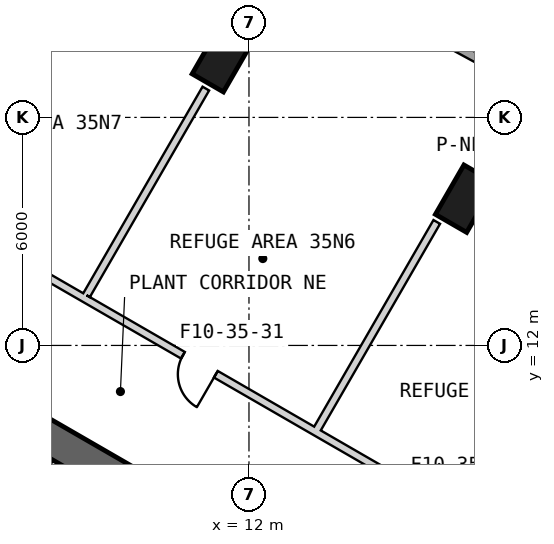
"""IFC4 building model, lengths in metres.
Left out: names, types, materials, properties, quantities, classifications, styles, units other than length and angle.
Written with IfcOpenShell. Run it as: python <this file> out.ifc"""

import sys

from ifc_helpers import new_model, si_unit, direction, frame, frame_2d, origin, origin_2d, place, context, subcontext, project, spatial, rectangle, extrude, element, fill, save


model = new_model("IFC4")
c1 = context("Model", 3, precision=1e-05, world=origin(), true_north=direction((0.0, 1.0)))
c2 = subcontext(c1, "Body", "Model", "MODEL_VIEW")
j1 = project(units=[si_unit("LENGTHUNIT", "METRE"), si_unit("PLANEANGLEUNIT", "RADIAN")], contexts=[c1])
p1 = place(None, origin())
s1 = spatial("IfcSite", under=j1, at=p1, CompositionType="ELEMENT")
p2 = place(p1, origin())
s2 = spatial("IfcBuilding", under=s1, at=p2, CompositionType="ELEMENT")
p3 = place(p2, frame((0.0, 0.0, 163.2)))
s3 = spatial("IfcBuildingStorey", under=s2, at=p3, CompositionType="ELEMENT", Elevation=163.2)
for number, where, z_axis, x_axis in (
    (1, (17.692, 15.861, 0.0), (0.0, 0.0, 1.0), (0.5, 0.866, 0.0)),
    (2, (11.291, 19.557, 0.0), (0.0, 0.0, 1.0), (0.5, 0.866, 0.0)),
):
    element("IfcColumn", number, at=place(p3, frame(where, z_axis=z_axis, x_axis=x_axis)), inside=s3, PredefinedType="COLUMN", context=c2, shape_type="SweptSolid", body=[
        extrude(rectangle(XDim=1.5, YDim=0.95, at=origin_2d()), origin(), (0.0, 0.0, 1.0), 5.7),
    ])
p4 = place(p3, frame((19.475, 2.208, 0.0), z_axis=(0.0, 0.0, 1.0), x_axis=(-0.866028369851, 0.499994862586, 0.0)))
e3 = element("IfcWall", 3, at=p4, inside=s3, PredefinedType="SHEAR", context=c2, shape_type="SweptSolid", body=[
    extrude(rectangle(XDim=31.523, YDim=0.9, at=frame_2d((15.762, 0.0))), origin(), (0.0, 0.0, 1.0), 6.0),
])
p5 = place(p4, frame((3.612, 0.0, 0.0)))
e4 = element("IfcOpeningElement", 4, at=p5, cuts=e3, PredefinedType="OPENING", context=c2, shape_type="SweptSolid", body=[
    extrude(rectangle(XDim=1.2, YDim=2.4, at=frame_2d((0.6, 1.2))), frame((0.0, 0.46, 0.0), z_axis=(0.0, -1.0, 0.0), x_axis=(1.0, 0.0, 0.0)), (0.0, 0.0, 1.0), 0.92),
])
p6 = place(p4, frame((26.712, 0.0, 0.0)))
e5 = element("IfcOpeningElement", 5, at=p6, cuts=e3, PredefinedType="OPENING", context=c2, shape_type="SweptSolid", body=[
    extrude(rectangle(XDim=1.2, YDim=2.4, at=frame_2d((0.6, 1.2))), frame((0.0, 0.46, 0.0), z_axis=(0.0, -1.0, 0.0), x_axis=(1.0, 0.0, 0.0)), (0.0, 0.0, 1.0), 0.92),
])
p7 = place(p3, frame((29.693, 13.206, 0.0), z_axis=(0.0, 0.0, 1.0), x_axis=(-0.878694903116, 0.477383773539, 0.0)))
e6 = element("IfcWall", 6, at=p7, inside=s3, PredefinedType="SOLIDWALL", context=c2, shape_type="SweptSolid", body=[
    extrude(rectangle(XDim=38.239, YDim=0.24, at=frame_2d((19.12, 0.0))), origin(), (0.0, 0.0, 1.0), 5.7),
])
p8 = place(p3, frame((6.795, 9.01, 0.0), z_axis=(0.0, 0.0, 1.0), x_axis=(-0.499984717929, -0.866034226713, 0.0)))
e7 = element("IfcWall", 7, at=p8, inside=s3, PredefinedType="PARTITIONING", context=c2, shape_type="SweptSolid", body=[
    extrude(rectangle(XDim=3.25, YDim=0.12, at=frame_2d((1.625, 0.0))), origin(), (0.0, 0.0, 1.0), 5.7),
])
p9 = place(p8, frame((1.225, 0.0, 0.0)))
e8 = element("IfcOpeningElement", 8, at=p9, cuts=e7, PredefinedType="OPENING", context=c2, shape_type="SweptSolid", body=[
    extrude(rectangle(XDim=0.8, YDim=2.1, at=frame_2d((0.4, 1.05))), frame((0.0, 0.07, 0.0), z_axis=(0.0, -1.0, 0.0), x_axis=(1.0, 0.0, 0.0)), (0.0, 0.0, 1.0), 0.14),
])
p10 = place(p3, frame((19.846, 6.208, 0.0), z_axis=(0.0, 0.0, 1.0), x_axis=(-0.866029143232, 0.499993523031, 0.0)))
e9 = element("IfcWall", 9, at=p10, inside=s3, PredefinedType="PARTITIONING", context=c2, shape_type="SweptSolid", body=[
    extrude(rectangle(XDim=7.017, YDim=0.2, at=frame_2d((3.508, 0.0))), origin(), (0.0, 0.0, 1.0), 4.98),
])
p11 = place(p10, frame((3.05, 0.0, 0.0)))
e10 = element("IfcOpeningElement", 10, at=p11, cuts=e9, PredefinedType="OPENING", context=c2, shape_type="SweptSolid", body=[
    extrude(rectangle(XDim=1.0, YDim=2.1, at=frame_2d((0.5, 1.05))), frame((0.0, 0.11, 0.0), z_axis=(0.0, -1.0, 0.0), x_axis=(1.0, 0.0, 0.0)), (0.0, 0.0, 1.0), 0.22),
])
p12 = place(p3, frame((13.77, 9.717, 0.0), z_axis=(0.0, 0.0, 1.0), x_axis=(-0.866024793964, 0.500001056239, 0.0)))
e11 = element("IfcWall", 11, at=p12, inside=s3, PredefinedType="PARTITIONING", context=c2, shape_type="SweptSolid", body=[
    extrude(rectangle(XDim=14.033, YDim=0.2, at=frame_2d((7.017, 0.0))), origin(), (0.0, 0.0, 1.0), 4.98),
])
p13 = place(p12, frame((3.05, 0.0, 0.0)))
e12 = element("IfcOpeningElement", 12, at=p13, cuts=e11, PredefinedType="OPENING", context=c2, shape_type="SweptSolid", body=[
    extrude(rectangle(XDim=1.0, YDim=2.1, at=frame_2d((0.5, 1.05))), frame((0.0, 0.11, 0.0), z_axis=(0.0, -1.0, 0.0), x_axis=(1.0, 0.0, 0.0)), (0.0, 0.0, 1.0), 0.22),
])
p14 = place(p12, frame((10.067, 0.0, 0.0)))
e13 = element("IfcOpeningElement", 13, at=p14, cuts=e11, PredefinedType="OPENING", context=c2, shape_type="SweptSolid", body=[
    extrude(rectangle(XDim=1.0, YDim=2.1, at=frame_2d((0.5, 1.05))), frame((0.0, 0.11, 0.0), z_axis=(0.0, -1.0, 0.0), x_axis=(1.0, 0.0, 0.0)), (0.0, 0.0, 1.0), 0.22),
])
p15 = place(p3, frame((13.802, 9.813, 0.0), z_axis=(0.0, 0.0, 1.0), x_axis=(0.499987288472, 0.866032742664, 0.0)))
e14 = element("IfcWall", 14, at=p15, inside=s3, PredefinedType="PARTITIONING", context=c2, shape_type="SweptSolid", body=[
    extrude(rectangle(XDim=6.278, YDim=0.2, at=frame_2d((3.139, 0.0))), origin(), (0.0, 0.0, 1.0), 4.98),
])
p16 = place(p3, frame((10.865, 18.758, 0.0), z_axis=(0.0, 0.0, 1.0), x_axis=(-0.499987288472, -0.866032742664, 0.0)))
e15 = element("IfcWall", 15, at=p16, inside=s3, PredefinedType="PARTITIONING", context=c2, shape_type="SweptSolid", body=[
    extrude(rectangle(XDim=6.278, YDim=0.2, at=frame_2d((3.139, 0.0))), origin(), (0.0, 0.0, 1.0), 5.07),
])
p17 = place(p13, origin())
e16 = element("IfcDoor", 16, at=p17, inside=s3, OperationType="SINGLE_SWING_LEFT", PredefinedType="USERDEFINED", context=c2, shape_type="SweptSolid", body=[
    extrude(rectangle(XDim=1.0, YDim=2.1, at=frame_2d((0.5, 1.05))), frame((0.0, 0.025, 0.0), z_axis=(0.0, -1.0, 0.0), x_axis=(1.0, 0.0, 0.0)), (0.0, 0.0, 1.0), 0.05),
])
fill(e12, e16)
save(model, sys.argv[1])
